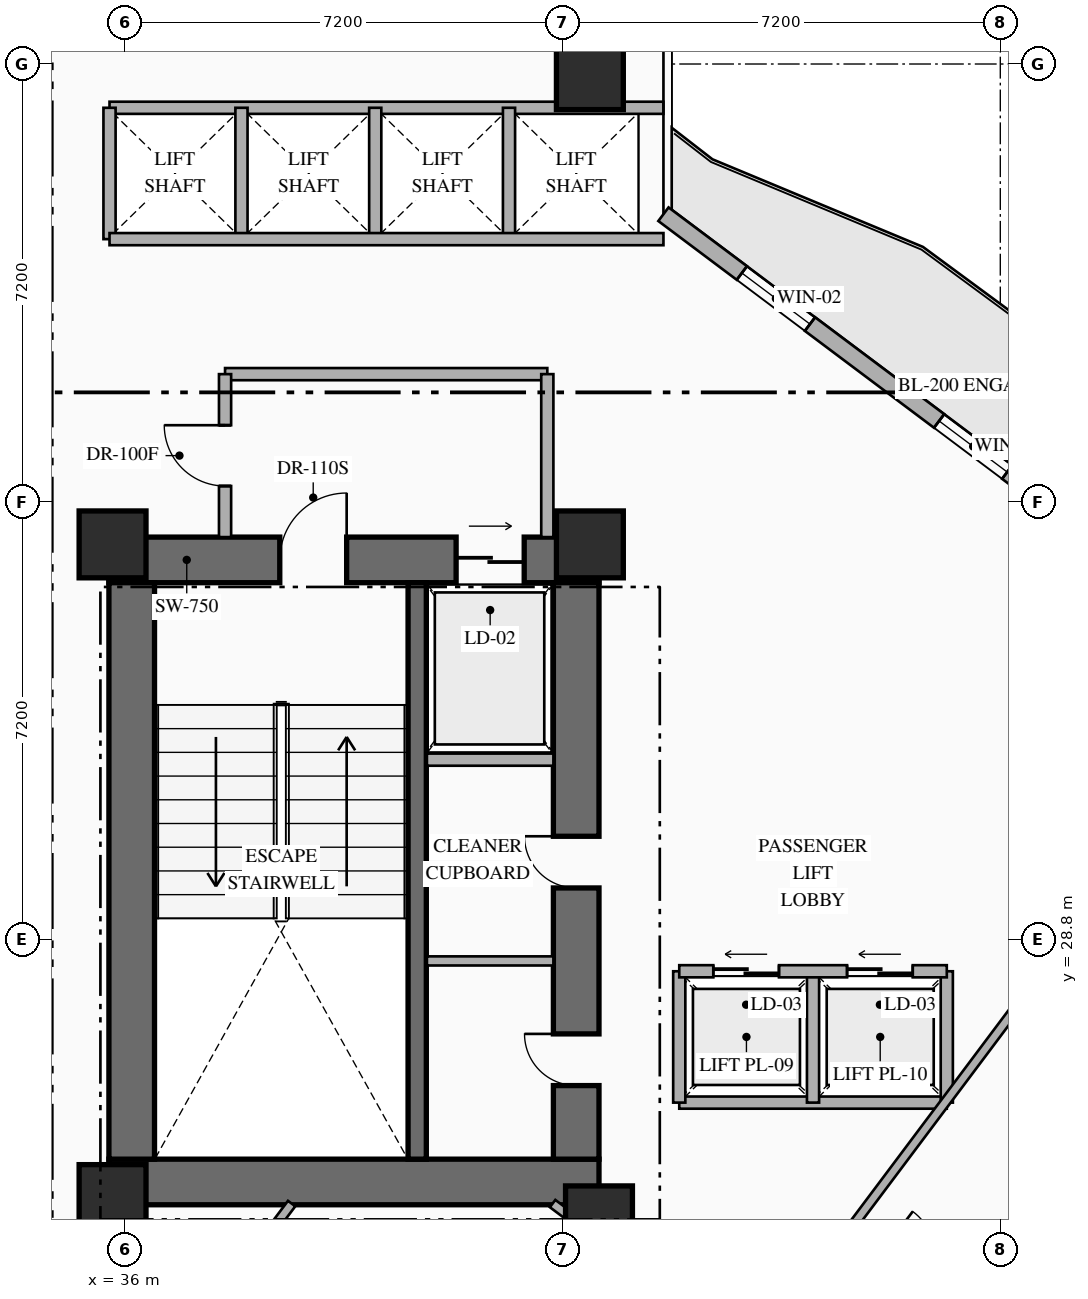
"""IFC4 building model, lengths in metres.
Left out: names, types, materials, properties, quantities, classifications, styles, units other than length and angle.
Written with IfcOpenShell. Run it as: python <this file> out.ifc"""

import sys

from ifc_helpers import new_model, si_unit, direction, frame, frame_2d, origin, origin_2d, place, context, subcontext, project, spatial, rectangle, extrude, element, fill, save


model = new_model("IFC4")
c1 = context("Model", 3, precision=1e-05, world=origin(), true_north=direction((0.0, 1.0)))
c2 = subcontext(c1, "Body", "Model", "MODEL_VIEW")
j1 = project(units=[si_unit("LENGTHUNIT", "METRE"), si_unit("PLANEANGLEUNIT", "RADIAN")], contexts=[c1])
p1 = place(None, origin())
s1 = spatial("IfcSite", under=j1, at=p1, CompositionType="ELEMENT")
p2 = place(p1, origin())
s2 = spatial("IfcBuilding", under=s1, at=p2, CompositionType="ELEMENT")
p3 = place(p2, frame((0.0, 0.0, 46.65)))
s3 = spatial("IfcBuildingStorey", under=s2, at=p3, CompositionType="ELEMENT", Elevation=46.65)
p4 = place(p3, frame((35.74, 24.815, 0.0), z_axis=(0.0, 0.0, 1.0), x_axis=(1.0, 0.0, 0.0)))
e1 = element("IfcWall", 1, at=p4, inside=s3, PredefinedType="SHEAR", context=c2, shape_type="SweptSolid", body=[
    extrude(rectangle(XDim=8.06, YDim=0.75, at=frame_2d((4.03, 0.0))), origin(), (0.0, 0.0, 1.0), 3.35),
])
p5 = place(p3, frame((35.74, 35.045, 0.0), z_axis=(0.0, 0.0, 1.0), x_axis=(1.0, 0.0, 0.0)))
e2 = element("IfcWall", 2, at=p5, inside=s3, PredefinedType="SHEAR", context=c2, shape_type="SweptSolid", body=[
    extrude(rectangle(XDim=8.06, YDim=0.75, at=frame_2d((4.03, 0.0))), origin(), (0.0, 0.0, 1.0), 3.35),
])
p6 = place(p5, frame((2.81, 0.0, 0.0)))
e3 = element("IfcOpeningElement", 3, at=p6, cuts=e2, PredefinedType="OPENING", context=c2, shape_type="SweptSolid", body=[
    extrude(rectangle(XDim=1.1, YDim=2.2, at=frame_2d((0.55, 1.1))), frame((0.0, 0.385, 0.0), z_axis=(0.0, -1.0, 0.0), x_axis=(1.0, 0.0, 0.0)), (0.0, 0.0, 1.0), 0.77),
])
p7 = place(p5, frame((5.71, 0.0, 0.0)))
e4 = element("IfcOpeningElement", 4, at=p7, cuts=e2, PredefinedType="OPENING", context=c2, shape_type="SweptSolid", body=[
    extrude(rectangle(XDim=1.12, YDim=2.15, at=frame_2d((0.56, 1.075))), frame((0.0, 0.385, 0.0), z_axis=(0.0, -1.0, 0.0), x_axis=(1.0, 0.0, 0.0)), (0.0, 0.0, 1.0), 0.77),
])
p8 = place(p3, frame((36.115, 25.19, 0.0), z_axis=(0.0, 0.0, 1.0), x_axis=(0.0, 1.0, 0.0)))
e5 = element("IfcWall", 5, at=p8, inside=s3, PredefinedType="SHEAR", context=c2, shape_type="SweptSolid", body=[
    extrude(rectangle(XDim=9.48, YDim=0.75, at=frame_2d((4.74, 0.0))), origin(), (0.0, 0.0, 1.0), 3.35),
])
p9 = place(p3, frame((43.425, 25.19, 0.0), z_axis=(0.0, 0.0, 1.0), x_axis=(0.0, 1.0, 0.0)))
e6 = element("IfcWall", 6, at=p9, inside=s3, PredefinedType="SHEAR", context=c2, shape_type="SweptSolid", body=[
    extrude(rectangle(XDim=9.48, YDim=0.75, at=frame_2d((4.74, 0.0))), origin(), (0.0, 0.0, 1.0), 3.35),
])
p10 = place(p9, frame((1.21, 0.0, 0.0)))
e7 = element("IfcOpeningElement", 7, at=p10, cuts=e6, PredefinedType="OPENING", context=c2, shape_type="SweptSolid", body=[
    extrude(rectangle(XDim=0.85, YDim=2.08, at=frame_2d((0.425, 1.04))), frame((0.0, 0.385, 0.0), z_axis=(0.0, -1.0, 0.0), x_axis=(1.0, 0.0, 0.0)), (0.0, 0.0, 1.0), 0.77),
])
p11 = place(p9, frame((4.46, 0.0, 0.0)))
e8 = element("IfcOpeningElement", 8, at=p11, cuts=e6, PredefinedType="OPENING", context=c2, shape_type="SweptSolid", body=[
    extrude(rectangle(XDim=0.85, YDim=2.08, at=frame_2d((0.425, 1.04))), frame((0.0, 0.385, 0.0), z_axis=(0.0, -1.0, 0.0), x_axis=(1.0, 0.0, 0.0)), (0.0, 0.0, 1.0), 0.77),
])
p12 = place(p3, frame((40.81, 25.19, 0.0), z_axis=(0.0, 0.0, 1.0), x_axis=(0.0, 1.0, 0.0)))
e9 = element("IfcWall", 9, at=p12, inside=s3, PredefinedType="SHEAR", context=c2, shape_type="SweptSolid", body=[
    extrude(rectangle(XDim=9.48, YDim=0.3, at=frame_2d((4.74, 0.0))), origin(), (0.0, 0.0, 1.0), 3.35),
])
for number, where, z_axis, x_axis in (
    (10, (35.8, 24.55, 0.0), (0.0, 0.0, 1.0), (1.0, 0.0, 0.0)),
    (11, (43.8, 24.2, 0.0), (0.0, 0.0, 1.0), (1.0, 0.0, 0.0)),
    (12, (35.8, 35.3, 0.0), (0.0, 0.0, 1.0), (1.0, 0.0, 0.0)),
    (13, (43.65, 35.3, 0.0), (0.0, 0.0, 1.0), (1.0, 0.0, 0.0)),
    (14, (43.65, 43.0, 0.0), (0.0, 0.0, 1.0), (1.0, 0.0, 0.0)),
):
    element("IfcColumn", number, at=place(p3, frame(where, z_axis=z_axis, x_axis=x_axis)), inside=s3, PredefinedType="COLUMN", context=c2, shape_type="SweptSolid", body=[
        extrude(rectangle(XDim=1.1, YDim=1.1, at=origin_2d()), origin(), (0.0, 0.0, 1.0), 3.35),
    ])
p13 = place(p3, frame((44.86, 40.73, 0.0), z_axis=(0.0, 0.0, 1.0), x_axis=(0.800006902154, -0.599990797017, 0.0)))
e15 = element("IfcWall", 15, at=p13, inside=s3, PredefinedType="STANDARD", context=c2, shape_type="SweptSolid", body=[
    extrude(rectangle(XDim=29.712, YDim=0.28, at=frame_2d((14.856, 0.0))), origin(), (0.0, 0.0, 1.0), 3.13),
])
p14 = place(p13, frame((14.249, 0.0, 0.0)))
e16 = element("IfcOpeningElement", 16, at=p14, cuts=e15, PredefinedType="OPENING", context=c2, shape_type="SweptSolid", body=[
    extrude(rectangle(XDim=1.1, YDim=2.2, at=frame_2d((0.55, 1.1))), frame((0.0, 0.15, 0.0), z_axis=(0.0, -1.0, 0.0), x_axis=(1.0, 0.0, 0.0)), (0.0, 0.0, 1.0), 0.3),
])
p15 = place(p13, frame((1.612, 0.0, 0.85)))
e17 = element("IfcOpeningElement", 17, at=p15, cuts=e15, PredefinedType="OPENING", context=c2, shape_type="SweptSolid", body=[
    extrude(rectangle(XDim=1.4, YDim=1.8, at=frame_2d((0.7, 0.9))), frame((0.0, 0.15, 0.0), z_axis=(0.0, -1.0, 0.0), x_axis=(1.0, 0.0, 0.0)), (0.0, 0.0, 1.0), 0.3),
])
p16 = place(p13, frame((5.667, 0.0, 0.85)))
e18 = element("IfcOpeningElement", 18, at=p16, cuts=e15, PredefinedType="OPENING", context=c2, shape_type="SweptSolid", body=[
    extrude(rectangle(XDim=1.4, YDim=1.8, at=frame_2d((0.7, 0.9))), frame((0.0, 0.15, 0.0), z_axis=(0.0, -1.0, 0.0), x_axis=(1.0, 0.0, 0.0)), (0.0, 0.0, 1.0), 0.3),
])
p17 = place(p13, frame((9.912, 0.0, 0.85)))
e19 = element("IfcOpeningElement", 19, at=p17, cuts=e15, PredefinedType="OPENING", context=c2, shape_type="SweptSolid", body=[
    extrude(rectangle(XDim=1.4, YDim=1.8, at=frame_2d((0.7, 0.9))), frame((0.0, 0.15, 0.0), z_axis=(0.0, -1.0, 0.0), x_axis=(1.0, 0.0, 0.0)), (0.0, 0.0, 1.0), 0.3),
])
p18 = place(p13, frame((18.803, 0.0, 0.85)))
e20 = element("IfcOpeningElement", 20, at=p18, cuts=e15, PredefinedType="OPENING", context=c2, shape_type="SweptSolid", body=[
    extrude(rectangle(XDim=1.4, YDim=1.8, at=frame_2d((0.7, 0.9))), frame((0.0, 0.15, 0.0), z_axis=(0.0, -1.0, 0.0), x_axis=(1.0, 0.0, 0.0)), (0.0, 0.0, 1.0), 0.3),
])
p19 = place(p13, frame((22.645, 0.0, 0.85)))
e21 = element("IfcOpeningElement", 21, at=p19, cuts=e15, PredefinedType="OPENING", context=c2, shape_type="SweptSolid", body=[
    extrude(rectangle(XDim=1.4, YDim=1.8, at=frame_2d((0.7, 0.9))), frame((0.0, 0.15, 0.0), z_axis=(0.0, -1.0, 0.0), x_axis=(1.0, 0.0, 0.0)), (0.0, 0.0, 1.0), 0.3),
])
p20 = place(p13, frame((27.668, 0.0, 0.85)))
e22 = element("IfcOpeningElement", 22, at=p20, cuts=e15, PredefinedType="OPENING", context=c2, shape_type="SweptSolid", body=[
    extrude(rectangle(XDim=1.4, YDim=1.8, at=frame_2d((0.7, 0.9))), frame((0.0, 0.15, 0.0), z_axis=(0.0, -1.0, 0.0), x_axis=(1.0, 0.0, 0.0)), (0.0, 0.0, 1.0), 0.3),
])
p21 = place(p3, frame((40.97, 31.76, 0.0), z_axis=(0.0, 0.0, 1.0), x_axis=(1.0, 0.0, 0.0)))
e23 = element("IfcWall", 23, at=p21, inside=s3, PredefinedType="STANDARD", context=c2, shape_type="SweptSolid", body=[
    extrude(rectangle(XDim=2.08, YDim=0.2, at=frame_2d((1.04, 0.0))), origin(), (0.0, 0.0, 1.0), 3.13),
])
p22 = place(p3, frame((40.97, 28.45, 0.0), z_axis=(0.0, 0.0, 1.0), x_axis=(1.0, 0.0, 0.0)))
e24 = element("IfcWall", 24, at=p22, inside=s3, PredefinedType="PARTITIONING", context=c2, shape_type="SweptSolid", body=[
    extrude(rectangle(XDim=2.08, YDim=0.15, at=frame_2d((1.04, 0.0))), origin(), (0.0, 0.0, 1.0), 3.13),
])
p23 = place(p3, frame((37.65, 38.1, 0.0), z_axis=(0.0, 0.0, 1.0), x_axis=(1.0, 0.0, 0.0)))
e25 = element("IfcWall", 25, at=p23, inside=s3, PredefinedType="STANDARD", context=c2, shape_type="SweptSolid", body=[
    extrude(rectangle(XDim=5.3, YDim=0.2, at=frame_2d((2.65, 0.0))), origin(), (0.0, 0.0, 1.0), 3.13),
])
p24 = place(p3, frame((42.95, 35.42, 0.0), z_axis=(0.0, 0.0, 1.0), x_axis=(0.0, 1.0, 0.0)))
e26 = element("IfcWall", 26, at=p24, inside=s3, PredefinedType="STANDARD", context=c2, shape_type="SweptSolid", body=[
    extrude(rectangle(XDim=2.68, YDim=0.2, at=frame_2d((1.34, 0.0))), origin(), (0.0, 0.0, 1.0), 3.13),
])
p25 = place(p3, frame((37.65, 35.42, 0.0), z_axis=(0.0, 0.0, 1.0), x_axis=(0.0, 1.0, 0.0)))
e27 = element("IfcWall", 27, at=p25, inside=s3, PredefinedType="STANDARD", context=c2, shape_type="SweptSolid", body=[
    extrude(rectangle(XDim=2.68, YDim=0.2, at=frame_2d((1.34, 0.0))), origin(), (0.0, 0.0, 1.0), 3.13),
])
p26 = place(p25, frame((0.84, 0.0, 0.0)))
e28 = element("IfcOpeningElement", 28, at=p26, cuts=e27, PredefinedType="OPENING", context=c2, shape_type="SweptSolid", body=[
    extrude(rectangle(XDim=1.0, YDim=2.2, at=frame_2d((0.5, 1.1))), frame((0.0, 0.11, 0.0), z_axis=(0.0, -1.0, 0.0), x_axis=(1.0, 0.0, 0.0)), (0.0, 0.0, 1.0), 0.22),
])
p27 = place(p3, frame((35.75, 42.48, 0.0), z_axis=(0.0, 0.0, 1.0), x_axis=(1.0, 0.0, 0.0)))
e29 = element("IfcWall", 29, at=p27, inside=s3, PredefinedType="STANDARD", context=c2, shape_type="SweptSolid", body=[
    extrude(rectangle(XDim=9.11, YDim=0.2, at=frame_2d((4.555, 0.0))), origin(), (0.0, 0.0, 1.0), 3.13),
])
for number, where, z_axis, x_axis in (
    (30, (35.75, 40.32, 0.0), (0.0, 0.0, 1.0), (0.0, 1.0, 0.0)),
    (31, (37.92, 40.32, 0.0), (0.0, 0.0, 1.0), (0.0, 1.0, 0.0)),
    (32, (40.12, 40.32, 0.0), (0.0, 0.0, 1.0), (0.0, 1.0, 0.0)),
    (33, (42.32, 40.32, 0.0), (0.0, 0.0, 1.0), (0.0, 1.0, 0.0)),
):
    element("IfcWall", number, at=place(p3, frame(where, z_axis=z_axis, x_axis=x_axis)), inside=s3, PredefinedType="STANDARD", context=c2, shape_type="SweptSolid", body=[
        extrude(rectangle(XDim=2.16, YDim=0.2, at=frame_2d((1.08, 0.0))), origin(), (0.0, 0.0, 1.0), 3.13),
    ])
p28 = place(p3, frame((35.75, 40.32, 0.0), z_axis=(0.0, 0.0, 1.0), x_axis=(1.0, 0.0, 0.0)))
e34 = element("IfcWall", 34, at=p28, inside=s3, PredefinedType="STANDARD", context=c2, shape_type="SweptSolid", body=[
    extrude(rectangle(XDim=9.11, YDim=0.2, at=frame_2d((4.555, 0.0))), origin(), (0.0, 0.0, 1.0), 3.13),
])
p29 = place(p3, frame((45.12, 26.12, 0.0), z_axis=(0.0, 0.0, 1.0), x_axis=(1.0, 0.0, 0.0)))
e35 = element("IfcWall", 35, at=p29, inside=s3, PredefinedType="STANDARD", context=c2, shape_type="SweptSolid", body=[
    extrude(rectangle(XDim=4.4, YDim=0.2, at=frame_2d((2.2, 0.0))), origin(), (0.0, 0.0, 1.0), 3.13),
])
for number, where, z_axis, x_axis in (
    (36, (45.12, 26.12, 0.0), (0.0, 0.0, 1.0), (0.0, 1.0, 0.0)),
    (37, (49.52, 26.12, 0.0), (0.0, 0.0, 1.0), (0.0, 1.0, 0.0)),
    (38, (47.32, 26.12, 0.0), (0.0, 0.0, 1.0), (0.0, 1.0, 0.0)),
):
    element("IfcWall", number, at=place(p3, frame(where, z_axis=z_axis, x_axis=x_axis)), inside=s3, PredefinedType="STANDARD", context=c2, shape_type="SweptSolid", body=[
        extrude(rectangle(XDim=2.16, YDim=0.2, at=frame_2d((1.08, 0.0))), origin(), (0.0, 0.0, 1.0), 3.13),
    ])
p30 = place(p3, frame((45.12, 28.28, 0.0), z_axis=(0.0, 0.0, 1.0), x_axis=(1.0, 0.0, 0.0)))
e39 = element("IfcWall", 39, at=p30, inside=s3, PredefinedType="STANDARD", context=c2, shape_type="SweptSolid", body=[
    extrude(rectangle(XDim=4.4, YDim=0.2, at=frame_2d((2.2, 0.0))), origin(), (0.0, 0.0, 1.0), 3.13),
])
p31 = place(p30, frame((0.56, 0.0, 0.0)))
e40 = element("IfcOpeningElement", 40, at=p31, cuts=e39, PredefinedType="OPENING", context=c2, shape_type="SweptSolid", body=[
    extrude(rectangle(XDim=1.08, YDim=2.15, at=frame_2d((0.54, 1.075))), frame((0.0, 0.11, 0.0), z_axis=(0.0, -1.0, 0.0), x_axis=(1.0, 0.0, 0.0)), (0.0, 0.0, 1.0), 0.22),
])
p32 = place(p30, frame((2.76, 0.0, 0.0)))
e41 = element("IfcOpeningElement", 41, at=p32, cuts=e39, PredefinedType="OPENING", context=c2, shape_type="SweptSolid", body=[
    extrude(rectangle(XDim=1.08, YDim=2.15, at=frame_2d((0.54, 1.075))), frame((0.0, 0.11, 0.0), z_axis=(0.0, -1.0, 0.0), x_axis=(1.0, 0.0, 0.0)), (0.0, 0.0, 1.0), 0.22),
])
p33 = place(p3, frame((43.037, 24.46, 0.0), z_axis=(0.0, 0.0, 1.0), x_axis=(0.799971872363, -0.600037501685, 0.0)))
e42 = element("IfcWall", 42, at=p33, inside=s3, PredefinedType="PARTITIONING", context=c2, shape_type="SweptSolid", body=[
    extrude(rectangle(XDim=4.167, YDim=0.15, at=frame_2d((2.083, 0.0))), origin(), (0.0, 0.0, 1.0), 2.425),
])
p34 = place(p33, frame((2.468, 0.0, 0.0)))
e43 = element("IfcOpeningElement", 43, at=p34, cuts=e42, PredefinedType="OPENING", context=c2, shape_type="SweptSolid", body=[
    extrude(rectangle(XDim=0.95, YDim=2.15, at=frame_2d((0.475, 1.075))), frame((0.0, 0.085, 0.0), z_axis=(0.0, -1.0, 0.0), x_axis=(1.0, 0.0, 0.0)), (0.0, 0.0, 1.0), 0.17),
])
p35 = place(p3, frame((33.384, 17.312, 0.0), z_axis=(0.0, 0.0, 1.0), x_axis=(0.600008743659, 0.799993442181, 0.0)))
e44 = element("IfcWall", 44, at=p35, inside=s3, PredefinedType="PARTITIONING", context=c2, shape_type="SweptSolid", body=[
    extrude(rectangle(XDim=8.935, YDim=0.15, at=frame_2d((4.468, 0.0))), origin(), (0.0, 0.0, 1.0), 3.13),
])
p36 = place(p3, frame((49.67, 22.61, 0.0), z_axis=(0.0, 0.0, 1.0), x_axis=(0.600065100855, 0.79995117022, 0.0)))
e45 = element("IfcWall", 45, at=p36, inside=s3, PredefinedType="PARTITIONING", context=c2, shape_type="SweptSolid", body=[
    extrude(rectangle(XDim=2.4, YDim=0.12, at=frame_2d((1.2, 0.0))), origin(), (0.0, 0.0, 1.0), 3.13),
])
p37 = place(p36, frame((0.8, 0.0, 0.0)))
e46 = element("IfcOpeningElement", 46, at=p37, cuts=e45, PredefinedType="OPENING", context=c2, shape_type="SweptSolid", body=[
    extrude(rectangle(XDim=0.8, YDim=2.06, at=frame_2d((0.4, 1.03))), frame((0.0, 0.07, 0.0), z_axis=(0.0, -1.0, 0.0), x_axis=(1.0, 0.0, 0.0)), (0.0, 0.0, 1.0), 0.14),
])
p38 = place(p3, frame((47.87, 23.96, 0.0), z_axis=(0.0, 0.0, 1.0), x_axis=(0.599996617946, 0.80000253653, 0.0)))
e47 = element("IfcWall", 47, at=p38, inside=s3, PredefinedType="PARTITIONING", context=c2, shape_type="SweptSolid", body=[
    extrude(rectangle(XDim=11.55, YDim=0.15, at=frame_2d((5.775, 0.0))), origin(), (0.0, 0.0, 1.0), 3.13),
])
p39 = place(p15, origin())
e48 = element("IfcWindow", 48, at=p39, inside=s3, PartitioningType="SINGLE_PANEL", PredefinedType="WINDOW", context=c2, shape_type="SweptSolid", body=[
    extrude(rectangle(XDim=1.4, YDim=1.8, at=frame_2d((0.7, 0.9))), frame((0.0, 0.03, 0.0), z_axis=(0.0, -1.0, 0.0), x_axis=(1.0, 0.0, 0.0)), (0.0, 0.0, 1.0), 0.06),
])
fill(e17, e48)
p40 = place(p16, origin())
e49 = element("IfcWindow", 49, at=p40, inside=s3, PartitioningType="SINGLE_PANEL", PredefinedType="WINDOW", context=c2, shape_type="SweptSolid", body=[
    extrude(rectangle(XDim=1.4, YDim=1.8, at=frame_2d((0.7, 0.9))), frame((0.0, 0.03, 0.0), z_axis=(0.0, -1.0, 0.0), x_axis=(1.0, 0.0, 0.0)), (0.0, 0.0, 1.0), 0.06),
])
fill(e18, e49)
p41 = place(p6, origin())
e50 = element("IfcDoor", 50, at=p41, inside=s3, OperationType="SINGLE_SWING_RIGHT", PredefinedType="DOOR", context=c2, shape_type="SweptSolid", body=[
    extrude(rectangle(XDim=1.1, YDim=2.2, at=frame_2d((0.55, 1.1))), frame((0.0, 0.025, 0.0), z_axis=(0.0, -1.0, 0.0), x_axis=(1.0, 0.0, 0.0)), (0.0, 0.0, 1.0), 0.05),
])
fill(e3, e50)
p42 = place(p7, origin())
e51 = element("IfcDoor", 51, at=p42, inside=s3, OperationType="SLIDING_TO_RIGHT", PredefinedType="USERDEFINED", context=c2, shape_type="SweptSolid", body=[
    extrude(rectangle(XDim=1.12, YDim=2.15, at=frame_2d((0.56, 1.075))), frame((0.0, 0.025, 0.0), z_axis=(0.0, -1.0, 0.0), x_axis=(1.0, 0.0, 0.0)), (0.0, 0.0, 1.0), 0.05),
])
fill(e4, e51)
p43 = place(p10, origin())
e52 = element("IfcDoor", 52, at=p43, inside=s3, OperationType="SINGLE_SWING_RIGHT", PredefinedType="DOOR", context=c2, shape_type="SweptSolid", body=[
    extrude(rectangle(XDim=0.85, YDim=2.08, at=frame_2d((0.425, 1.04))), frame((0.0, 0.025, 0.0), z_axis=(0.0, -1.0, 0.0), x_axis=(1.0, 0.0, 0.0)), (0.0, 0.0, 1.0), 0.05),
])
fill(e7, e52)
p44 = place(p11, origin())
e53 = element("IfcDoor", 53, at=p44, inside=s3, OperationType="SINGLE_SWING_RIGHT", PredefinedType="DOOR", context=c2, shape_type="SweptSolid", body=[
    extrude(rectangle(XDim=0.85, YDim=2.08, at=frame_2d((0.425, 1.04))), frame((0.0, 0.025, 0.0), z_axis=(0.0, -1.0, 0.0), x_axis=(1.0, 0.0, 0.0)), (0.0, 0.0, 1.0), 0.05),
])
fill(e8, e53)
p45 = place(p26, origin())
e54 = element("IfcDoor", 54, at=p45, inside=s3, OperationType="SINGLE_SWING_RIGHT", PredefinedType="DOOR", context=c2, shape_type="SweptSolid", body=[
    extrude(rectangle(XDim=1.0, YDim=2.2, at=frame_2d((0.5, 1.1))), frame((0.0, 0.025, 0.0), z_axis=(0.0, -1.0, 0.0), x_axis=(1.0, 0.0, 0.0)), (0.0, 0.0, 1.0), 0.05),
])
fill(e28, e54)
p46 = place(p31, origin())
e55 = element("IfcDoor", 55, at=p46, inside=s3, OperationType="SLIDING_TO_LEFT", PredefinedType="USERDEFINED", context=c2, shape_type="SweptSolid", body=[
    extrude(rectangle(XDim=1.08, YDim=2.15, at=frame_2d((0.54, 1.075))), frame((0.0, 0.025, 0.0), z_axis=(0.0, -1.0, 0.0), x_axis=(1.0, 0.0, 0.0)), (0.0, 0.0, 1.0), 0.05),
])
fill(e40, e55)
p47 = place(p32, origin())
e56 = element("IfcDoor", 56, at=p47, inside=s3, OperationType="SLIDING_TO_LEFT", PredefinedType="USERDEFINED", context=c2, shape_type="SweptSolid", body=[
    extrude(rectangle(XDim=1.08, YDim=2.15, at=frame_2d((0.54, 1.075))), frame((0.0, 0.025, 0.0), z_axis=(0.0, -1.0, 0.0), x_axis=(1.0, 0.0, 0.0)), (0.0, 0.0, 1.0), 0.05),
])
fill(e41, e56)
save(model, sys.argv[1])
